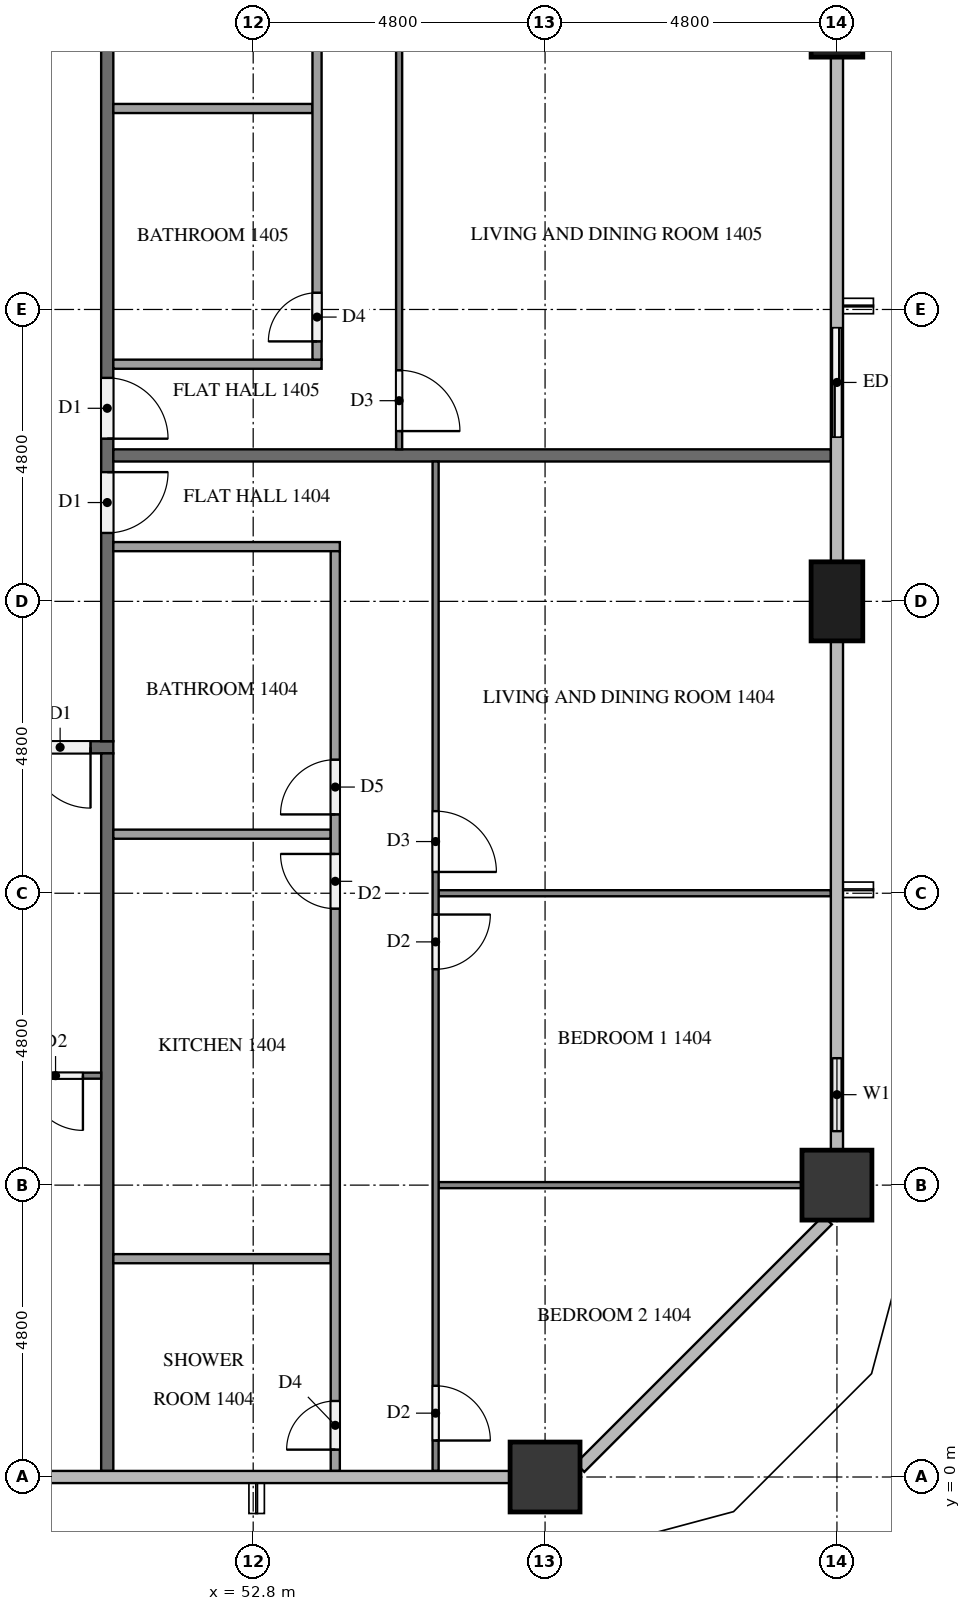
"""IFC4 building model, lengths in metres.
Left out: names, types, materials, properties, quantities, classifications, styles, units other than length and angle.
Written with IfcOpenShell. Run it as: python <this file> out.ifc"""

import sys

from ifc_helpers import new_model, si_unit, direction, frame, frame_2d, origin, origin_2d, place, context, subcontext, project, spatial, rectangle, extrude, element, fill, save


model = new_model("IFC4")
c1 = context("Model", 3, precision=1e-05, world=origin(), true_north=direction((0.0, 1.0)))
c2 = subcontext(c1, "Body", "Model", "MODEL_VIEW")
j1 = project(units=[si_unit("LENGTHUNIT", "METRE"), si_unit("PLANEANGLEUNIT", "RADIAN")], contexts=[c1])
p1 = place(None, origin())
s1 = spatial("IfcSite", under=j1, at=p1, CompositionType="ELEMENT")
p2 = place(p1, origin())
s2 = spatial("IfcBuilding", under=s1, at=p2, CompositionType="ELEMENT")
p3 = place(p2, frame((0.0, 0.0, 59.3)))
s3 = spatial("IfcBuildingStorey", under=s2, at=p3, CompositionType="ELEMENT", Elevation=59.3)
for number, where, z_axis, x_axis in (
    (1, (57.6, 0.0, 0.0), (0.0, 0.0, 1.0), (1.0, 0.0, 0.0)),
    (2, (62.4, 4.8, 0.0), (0.0, 0.0, 1.0), (1.0, 0.0, 0.0)),
):
    element("IfcColumn", number, at=place(p3, frame(where, z_axis=z_axis, x_axis=x_axis)), inside=s3, PredefinedType="COLUMN", context=c2, shape_type="SweptSolid", body=[
        extrude(rectangle(XDim=1.15, YDim=1.15, at=origin_2d()), origin(), (0.0, 0.0, 1.0), 3.2),
    ])
for number, where, z_axis, x_axis in (
    (3, (62.4, 14.4, 0.0), (0.0, 0.0, 1.0), (0.0, 1.0, 0.0)),
    (4, (62.4, 24.0, 0.0), (0.0, 0.0, 1.0), (0.0, 1.0, 0.0)),
):
    element("IfcColumn", number, at=place(p3, frame(where, z_axis=z_axis, x_axis=x_axis)), inside=s3, PredefinedType="COLUMN", context=c2, shape_type="SweptSolid", body=[
        extrude(rectangle(XDim=1.3, YDim=0.85, at=origin_2d()), origin(), (0.0, 0.0, 1.0), 3.2),
    ])
p4 = place(p3, frame((62.4, 5.375, 0.0), z_axis=(0.0, 0.0, 1.0), x_axis=(0.0, 1.0, 0.0)))
e5 = element("IfcWall", 5, at=p4, inside=s3, PredefinedType="SOLIDWALL", context=c2, shape_type="SweptSolid", body=[
    extrude(rectangle(XDim=1.825, YDim=0.15, at=frame_2d((0.913, 0.0))), origin(), (0.0, 0.0, 1.0), 3.2),
])
p5 = place(p4, frame((0.312, 0.0, 0.9)))
e6 = element("IfcOpeningElement", 6, at=p5, cuts=e5, PredefinedType="OPENING", context=c2, shape_type="SweptSolid", body=[
    extrude(rectangle(XDim=1.2, YDim=1.4, at=frame_2d((0.6, 0.7))), frame((0.0, 0.085, 0.0), z_axis=(0.0, -1.0, 0.0), x_axis=(1.0, 0.0, 0.0)), (0.0, 0.0, 1.0), 0.17),
])
p6 = place(p3, frame((62.4, 16.8, 0.0), z_axis=(0.0, 0.0, 1.0), x_axis=(0.0, 1.0, 0.0)))
e7 = element("IfcWall", 7, at=p6, inside=s3, PredefinedType="SOLIDWALL", context=c2, shape_type="SweptSolid", body=[
    extrude(rectangle(XDim=2.4, YDim=0.15, at=frame_2d((1.2, 0.0))), origin(), (0.0, 0.0, 1.0), 3.2),
])
p7 = place(p6, frame((0.3, 0.0, 0.0)))
e8 = element("IfcOpeningElement", 8, at=p7, cuts=e7, PredefinedType="OPENING", context=c2, shape_type="SweptSolid", body=[
    extrude(rectangle(XDim=1.8, YDim=2.4, at=frame_2d((0.9, 1.2))), frame((0.0, 0.085, 0.0), z_axis=(0.0, -1.0, 0.0), x_axis=(1.0, 0.0, 0.0)), (0.0, 0.0, 1.0), 0.17),
])
p8 = place(p3, frame((50.5, 12.0, 0.0), z_axis=(0.0, 0.0, 1.0), x_axis=(-1.0, 0.0, 0.0)))
e9 = element("IfcWall", 9, at=p8, inside=s3, PredefinedType="PARTITIONING", context=c2, shape_type="SweptSolid", body=[
    extrude(rectangle(XDim=38.6, YDim=0.2, at=frame_2d((19.3, 0.0))), origin(), (0.0, 0.0, 1.0), 3.2),
])
p9 = place(p8, frame((37.225, 0.0, 0.0)))
e10 = element("IfcOpeningElement", 10, at=p9, cuts=e9, PredefinedType="OPENING", context=c2, shape_type="SweptSolid", body=[
    extrude(rectangle(XDim=1.0, YDim=2.1, at=frame_2d((0.5, 1.05))), frame((0.0, 0.11, 0.0), z_axis=(0.0, -1.0, 0.0), x_axis=(1.0, 0.0, 0.0)), (0.0, 0.0, 1.0), 0.22),
])
p10 = place(p8, frame((22.825, 0.0, 0.0)))
e11 = element("IfcOpeningElement", 11, at=p10, cuts=e9, PredefinedType="OPENING", context=c2, shape_type="SweptSolid", body=[
    extrude(rectangle(XDim=1.0, YDim=2.1, at=frame_2d((0.5, 1.05))), frame((0.0, 0.11, 0.0), z_axis=(0.0, -1.0, 0.0), x_axis=(1.0, 0.0, 0.0)), (0.0, 0.0, 1.0), 0.22),
])
p11 = place(p8, frame((0.375, 0.0, 0.0)))
e12 = element("IfcOpeningElement", 12, at=p11, cuts=e9, PredefinedType="OPENING", context=c2, shape_type="SweptSolid", body=[
    extrude(rectangle(XDim=1.0, YDim=2.1, at=frame_2d((0.5, 1.05))), frame((0.0, 0.11, 0.0), z_axis=(0.0, -1.0, 0.0), x_axis=(1.0, 0.0, 0.0)), (0.0, 0.0, 1.0), 0.22),
])
p12 = place(p3, frame((50.4, 40.7, 0.0), z_axis=(0.0, 0.0, 1.0), x_axis=(0.0, -1.0, 0.0)))
e13 = element("IfcWall", 13, at=p12, inside=s3, PredefinedType="PARTITIONING", context=c2, shape_type="SweptSolid", body=[
    extrude(rectangle(XDim=28.6, YDim=0.2, at=frame_2d((14.3, 0.0))), origin(), (0.0, 0.0, 1.0), 3.2),
])
p13 = place(p12, frame((24.175, 0.0, 0.0)))
e14 = element("IfcOpeningElement", 14, at=p13, cuts=e13, PredefinedType="OPENING", context=c2, shape_type="SweptSolid", body=[
    extrude(rectangle(XDim=1.0, YDim=2.1, at=frame_2d((0.5, 1.05))), frame((0.0, 0.11, 0.0), z_axis=(0.0, -1.0, 0.0), x_axis=(1.0, 0.0, 0.0)), (0.0, 0.0, 1.0), 0.22),
])
p14 = place(p12, frame((22.625, 0.0, 0.0)))
e15 = element("IfcOpeningElement", 15, at=p14, cuts=e13, PredefinedType="OPENING", context=c2, shape_type="SweptSolid", body=[
    extrude(rectangle(XDim=1.0, YDim=2.1, at=frame_2d((0.5, 1.05))), frame((0.0, 0.11, 0.0), z_axis=(0.0, -1.0, 0.0), x_axis=(1.0, 0.0, 0.0)), (0.0, 0.0, 1.0), 0.22),
])
p15 = place(p12, frame((10.625, 0.0, 0.0)))
e16 = element("IfcOpeningElement", 16, at=p15, cuts=e13, PredefinedType="OPENING", context=c2, shape_type="SweptSolid", body=[
    extrude(rectangle(XDim=1.0, YDim=2.1, at=frame_2d((0.5, 1.05))), frame((0.0, 0.11, 0.0), z_axis=(0.0, -1.0, 0.0), x_axis=(1.0, 0.0, 0.0)), (0.0, 0.0, 1.0), 0.22),
])
p16 = place(p3, frame((50.4, 11.9, 0.0), z_axis=(0.0, 0.0, 1.0), x_axis=(0.0, -1.0, 0.0)))
e17 = element("IfcWall", 17, at=p16, inside=s3, PredefinedType="PARTITIONING", context=c2, shape_type="SweptSolid", body=[
    extrude(rectangle(XDim=11.8, YDim=0.2, at=frame_2d((5.9, 0.0))), origin(), (0.0, 0.0, 1.0), 3.2),
])
p17 = place(p3, frame((50.5, 16.8, 0.0), z_axis=(0.0, 0.0, 1.0), x_axis=(1.0, 0.0, 0.0)))
e18 = element("IfcWall", 18, at=p17, inside=s3, PredefinedType="PARTITIONING", context=c2, shape_type="SweptSolid", body=[
    extrude(rectangle(XDim=11.8, YDim=0.2, at=frame_2d((5.9, 0.0))), origin(), (0.0, 0.0, 1.0), 3.2),
])
p18 = place(p3, frame((50.3, 6.6, 0.0), z_axis=(0.0, 0.0, 1.0), x_axis=(-1.0, 0.0, 0.0)))
e19 = element("IfcWall", 19, at=p18, inside=s3, PredefinedType="PARTITIONING", context=c2, shape_type="SweptSolid", body=[
    extrude(rectangle(XDim=9.4, YDim=0.1, at=frame_2d((4.7, 0.0))), origin(), (0.0, 0.0, 1.0), 3.2),
])
p19 = place(p18, frame((0.3, 0.0, 0.0)))
e20 = element("IfcOpeningElement", 20, at=p19, cuts=e19, PredefinedType="OPENING", context=c2, shape_type="SweptSolid", body=[
    extrude(rectangle(XDim=0.9, YDim=2.1, at=frame_2d((0.45, 1.05))), frame((0.0, 0.06, 0.0), z_axis=(0.0, -1.0, 0.0), x_axis=(1.0, 0.0, 0.0)), (0.0, 0.0, 1.0), 0.12),
])
p20 = place(p18, frame((8.1, 0.0, 0.0)))
e21 = element("IfcOpeningElement", 21, at=p20, cuts=e19, PredefinedType="OPENING", context=c2, shape_type="SweptSolid", body=[
    extrude(rectangle(XDim=1.0, YDim=2.1, at=frame_2d((0.5, 1.05))), frame((0.0, 0.06, 0.0), z_axis=(0.0, -1.0, 0.0), x_axis=(1.0, 0.0, 0.0)), (0.0, 0.0, 1.0), 0.12),
])
p21 = place(p3, frame((55.85, 9.6, 0.0), z_axis=(0.0, 0.0, 1.0), x_axis=(1.0, 0.0, 0.0)))
e22 = element("IfcWall", 22, at=p21, inside=s3, PredefinedType="PARTITIONING", context=c2, shape_type="SweptSolid", body=[
    extrude(rectangle(XDim=6.45, YDim=0.1, at=frame_2d((3.225, 0.0))), origin(), (0.0, 0.0, 1.0), 3.2),
])
p22 = place(p3, frame((55.85, 4.8, 0.0), z_axis=(0.0, 0.0, 1.0), x_axis=(1.0, 0.0, 0.0)))
e23 = element("IfcWall", 23, at=p22, inside=s3, PredefinedType="PARTITIONING", context=c2, shape_type="SweptSolid", body=[
    extrude(rectangle(XDim=5.975, YDim=0.1, at=frame_2d((2.987, 0.0))), origin(), (0.0, 0.0, 1.0), 3.2),
])
p23 = place(p3, frame((55.8, 16.7, 0.0), z_axis=(0.0, 0.0, 1.0), x_axis=(0.0, -1.0, 0.0)))
e24 = element("IfcWall", 24, at=p23, inside=s3, PredefinedType="PARTITIONING", context=c2, shape_type="SweptSolid", body=[
    extrude(rectangle(XDim=16.6, YDim=0.1, at=frame_2d((8.3, 0.0))), origin(), (0.0, 0.0, 1.0), 3.2),
])
p24 = place(p23, frame((5.75, 0.0, 0.0)))
e25 = element("IfcOpeningElement", 25, at=p24, cuts=e24, PredefinedType="OPENING", context=c2, shape_type="SweptSolid", body=[
    extrude(rectangle(XDim=1.0, YDim=2.1, at=frame_2d((0.5, 1.05))), frame((0.0, 0.06, 0.0), z_axis=(0.0, -1.0, 0.0), x_axis=(1.0, 0.0, 0.0)), (0.0, 0.0, 1.0), 0.12),
])
p25 = place(p23, frame((7.45, 0.0, 0.0)))
e26 = element("IfcOpeningElement", 26, at=p25, cuts=e24, PredefinedType="OPENING", context=c2, shape_type="SweptSolid", body=[
    extrude(rectangle(XDim=0.9, YDim=2.1, at=frame_2d((0.45, 1.05))), frame((0.0, 0.06, 0.0), z_axis=(0.0, -1.0, 0.0), x_axis=(1.0, 0.0, 0.0)), (0.0, 0.0, 1.0), 0.12),
])
p26 = place(p23, frame((15.2, 0.0, 0.0)))
e27 = element("IfcOpeningElement", 27, at=p26, cuts=e24, PredefinedType="OPENING", context=c2, shape_type="SweptSolid", body=[
    extrude(rectangle(XDim=0.9, YDim=2.1, at=frame_2d((0.45, 1.05))), frame((0.0, 0.06, 0.0), z_axis=(0.0, -1.0, 0.0), x_axis=(1.0, 0.0, 0.0)), (0.0, 0.0, 1.0), 0.12),
])
for number, where, z_axis, x_axis in (
    (28, (50.5, 10.571, 0.0), (0.0, 0.0, 1.0), (1.0, 0.0, 0.0)),
    (29, (50.5, 3.59, 0.0), (0.0, 0.0, 1.0), (1.0, 0.0, 0.0)),
):
    element("IfcWall", number, at=place(p3, frame(where, z_axis=z_axis, x_axis=x_axis)), inside=s3, PredefinedType="PARTITIONING", context=c2, shape_type="SweptSolid", body=[
        extrude(rectangle(XDim=3.575, YDim=0.15, at=frame_2d((1.788, 0.0))), origin(), (0.0, 0.0, 1.0), 3.2),
    ])
p27 = place(p3, frame((50.5, 15.3, 0.0), z_axis=(0.0, 0.0, 1.0), x_axis=(1.0, 0.0, 0.0)))
e30 = element("IfcWall", 30, at=p27, inside=s3, PredefinedType="PARTITIONING", context=c2, shape_type="SweptSolid", body=[
    extrude(rectangle(XDim=3.725, YDim=0.15, at=frame_2d((1.863, 0.0))), origin(), (0.0, 0.0, 1.0), 3.2),
])
p28 = place(p3, frame((54.15, 0.1, 0.0), z_axis=(0.0, 0.0, 1.0), x_axis=(0.0, 1.0, 0.0)))
e31 = element("IfcWall", 31, at=p28, inside=s3, PredefinedType="PARTITIONING", context=c2, shape_type="SweptSolid", body=[
    extrude(rectangle(XDim=15.125, YDim=0.15, at=frame_2d((7.562, 0.0))), origin(), (0.0, 0.0, 1.0), 3.2),
])
p29 = place(p28, frame((10.796, 0.0, 0.0)))
e32 = element("IfcOpeningElement", 32, at=p29, cuts=e31, PredefinedType="OPENING", context=c2, shape_type="SweptSolid", body=[
    extrude(rectangle(XDim=0.9, YDim=2.1, at=frame_2d((0.45, 1.05))), frame((0.0, 0.085, 0.0), z_axis=(0.0, -1.0, 0.0), x_axis=(1.0, 0.0, 0.0)), (0.0, 0.0, 1.0), 0.17),
])
p30 = place(p28, frame((9.246, 0.0, 0.0)))
e33 = element("IfcOpeningElement", 33, at=p30, cuts=e31, PredefinedType="OPENING", context=c2, shape_type="SweptSolid", body=[
    extrude(rectangle(XDim=0.9, YDim=2.1, at=frame_2d((0.45, 1.05))), frame((0.0, 0.085, 0.0), z_axis=(0.0, -1.0, 0.0), x_axis=(1.0, 0.0, 0.0)), (0.0, 0.0, 1.0), 0.17),
])
p31 = place(p28, frame((0.35, 0.0, 0.0)))
e34 = element("IfcOpeningElement", 34, at=p31, cuts=e31, PredefinedType="OPENING", context=c2, shape_type="SweptSolid", body=[
    extrude(rectangle(XDim=0.8, YDim=2.1, at=frame_2d((0.4, 1.05))), frame((0.0, 0.085, 0.0), z_axis=(0.0, -1.0, 0.0), x_axis=(1.0, 0.0, 0.0)), (0.0, 0.0, 1.0), 0.17),
])
p32 = place(p3, frame((55.2, 28.7, 0.0), z_axis=(0.0, 0.0, 1.0), x_axis=(0.0, -1.0, 0.0)))
e35 = element("IfcWall", 35, at=p32, inside=s3, PredefinedType="PARTITIONING", context=c2, shape_type="SweptSolid", body=[
    extrude(rectangle(XDim=11.8, YDim=0.1, at=frame_2d((5.9, 0.0))), origin(), (0.0, 0.0, 1.0), 3.2),
])
p33 = place(p32, frame((10.5, 0.0, 0.0)))
e36 = element("IfcOpeningElement", 36, at=p33, cuts=e35, PredefinedType="OPENING", context=c2, shape_type="SweptSolid", body=[
    extrude(rectangle(XDim=1.0, YDim=2.1, at=frame_2d((0.5, 1.05))), frame((0.0, 0.06, 0.0), z_axis=(0.0, -1.0, 0.0), x_axis=(1.0, 0.0, 0.0)), (0.0, 0.0, 1.0), 0.12),
])
p34 = place(p32, frame((0.3, 0.0, 0.0)))
e37 = element("IfcOpeningElement", 37, at=p34, cuts=e35, PredefinedType="OPENING", context=c2, shape_type="SweptSolid", body=[
    extrude(rectangle(XDim=0.9, YDim=2.1, at=frame_2d((0.45, 1.05))), frame((0.0, 0.06, 0.0), z_axis=(0.0, -1.0, 0.0), x_axis=(1.0, 0.0, 0.0)), (0.0, 0.0, 1.0), 0.12),
])
p35 = place(p3, frame((50.5, 22.505, 0.0), z_axis=(0.0, 0.0, 1.0), x_axis=(1.0, 0.0, 0.0)))
e38 = element("IfcWall", 38, at=p35, inside=s3, PredefinedType="PARTITIONING", context=c2, shape_type="SweptSolid", body=[
    extrude(rectangle(XDim=3.275, YDim=0.15, at=frame_2d((1.637, 0.0))), origin(), (0.0, 0.0, 1.0), 3.2),
])
p36 = place(p3, frame((50.5, 18.3, 0.0), z_axis=(0.0, 0.0, 1.0), x_axis=(1.0, 0.0, 0.0)))
e39 = element("IfcWall", 39, at=p36, inside=s3, PredefinedType="PARTITIONING", context=c2, shape_type="SweptSolid", body=[
    extrude(rectangle(XDim=3.425, YDim=0.15, at=frame_2d((1.712, 0.0))), origin(), (0.0, 0.0, 1.0), 3.2),
])
p37 = place(p3, frame((53.85, 18.375, 0.0), z_axis=(0.0, 0.0, 1.0), x_axis=(0.0, 1.0, 0.0)))
e40 = element("IfcWall", 40, at=p37, inside=s3, PredefinedType="PARTITIONING", context=c2, shape_type="SweptSolid", body=[
    extrude(rectangle(XDim=10.325, YDim=0.15, at=frame_2d((5.163, 0.0))), origin(), (0.0, 0.0, 1.0), 3.2),
])
p38 = place(p37, frame((0.3, 0.0, 0.0)))
e41 = element("IfcOpeningElement", 41, at=p38, cuts=e40, PredefinedType="OPENING", context=c2, shape_type="SweptSolid", body=[
    extrude(rectangle(XDim=0.8, YDim=2.1, at=frame_2d((0.4, 1.05))), frame((0.0, 0.085, 0.0), z_axis=(0.0, -1.0, 0.0), x_axis=(1.0, 0.0, 0.0)), (0.0, 0.0, 1.0), 0.17),
])
p39 = place(p37, frame((9.075, 0.0, 0.0)))
e42 = element("IfcOpeningElement", 42, at=p39, cuts=e40, PredefinedType="OPENING", context=c2, shape_type="SweptSolid", body=[
    extrude(rectangle(XDim=0.9, YDim=2.1, at=frame_2d((0.45, 1.05))), frame((0.0, 0.085, 0.0), z_axis=(0.0, -1.0, 0.0), x_axis=(1.0, 0.0, 0.0)), (0.0, 0.0, 1.0), 0.17),
])
p40 = place(p5, origin())
e43 = element("IfcWindow", 43, at=p40, inside=s3, PartitioningType="SINGLE_PANEL", PredefinedType="WINDOW", context=c2, shape_type="SweptSolid", body=[
    extrude(rectangle(XDim=1.2, YDim=1.4, at=frame_2d((0.6, 0.7))), frame((0.0, 0.03, 0.0), z_axis=(0.0, -1.0, 0.0), x_axis=(1.0, 0.0, 0.0)), (0.0, 0.0, 1.0), 0.06),
])
fill(e6, e43)
p41 = place(p7, origin())
e44 = element("IfcDoor", 44, at=p41, inside=s3, OperationType="SLIDING_TO_LEFT", PredefinedType="DOOR", context=c2, shape_type="SweptSolid", body=[
    extrude(rectangle(XDim=1.8, YDim=2.4, at=frame_2d((0.9, 1.2))), frame((0.0, 0.025, 0.0), z_axis=(0.0, -1.0, 0.0), x_axis=(1.0, 0.0, 0.0)), (0.0, 0.0, 1.0), 0.05),
])
fill(e8, e44)
p42 = place(p11, origin())
e45 = element("IfcDoor", 45, at=p42, inside=s3, OperationType="SINGLE_SWING_LEFT", PredefinedType="DOOR", context=c2, shape_type="SweptSolid", body=[
    extrude(rectangle(XDim=1.0, YDim=2.1, at=frame_2d((0.5, 1.05))), frame((0.0, 0.025, 0.0), z_axis=(0.0, -1.0, 0.0), x_axis=(1.0, 0.0, 0.0)), (0.0, 0.0, 1.0), 0.05),
])
fill(e12, e45)
p43 = place(p13, origin())
e46 = element("IfcDoor", 46, at=p43, inside=s3, OperationType="SINGLE_SWING_LEFT", PredefinedType="DOOR", context=c2, shape_type="SweptSolid", body=[
    extrude(rectangle(XDim=1.0, YDim=2.1, at=frame_2d((0.5, 1.05))), frame((0.0, 0.025, 0.0), z_axis=(0.0, -1.0, 0.0), x_axis=(1.0, 0.0, 0.0)), (0.0, 0.0, 1.0), 0.05),
])
fill(e14, e46)
p44 = place(p14, origin())
e47 = element("IfcDoor", 47, at=p44, inside=s3, OperationType="SINGLE_SWING_RIGHT", PredefinedType="DOOR", context=c2, shape_type="SweptSolid", body=[
    extrude(rectangle(XDim=1.0, YDim=2.1, at=frame_2d((0.5, 1.05))), frame((0.0, 0.025, 0.0), z_axis=(0.0, -1.0, 0.0), x_axis=(1.0, 0.0, 0.0)), (0.0, 0.0, 1.0), 0.05),
])
fill(e15, e47)
p45 = place(p19, origin())
e48 = element("IfcDoor", 48, at=p45, inside=s3, OperationType="SINGLE_SWING_LEFT", PredefinedType="DOOR", context=c2, shape_type="SweptSolid", body=[
    extrude(rectangle(XDim=0.9, YDim=2.1, at=frame_2d((0.45, 1.05))), frame((0.0, 0.025, 0.0), z_axis=(0.0, -1.0, 0.0), x_axis=(1.0, 0.0, 0.0)), (0.0, 0.0, 1.0), 0.05),
])
fill(e20, e48)
p46 = place(p24, origin())
e49 = element("IfcDoor", 49, at=p46, inside=s3, OperationType="SINGLE_SWING_RIGHT", PredefinedType="DOOR", context=c2, shape_type="SweptSolid", body=[
    extrude(rectangle(XDim=1.0, YDim=2.1, at=frame_2d((0.5, 1.05))), frame((0.0, 0.025, 0.0), z_axis=(0.0, -1.0, 0.0), x_axis=(1.0, 0.0, 0.0)), (0.0, 0.0, 1.0), 0.05),
])
fill(e25, e49)
p47 = place(p25, origin())
e50 = element("IfcDoor", 50, at=p47, inside=s3, OperationType="SINGLE_SWING_LEFT", PredefinedType="DOOR", context=c2, shape_type="SweptSolid", body=[
    extrude(rectangle(XDim=0.9, YDim=2.1, at=frame_2d((0.45, 1.05))), frame((0.0, 0.025, 0.0), z_axis=(0.0, -1.0, 0.0), x_axis=(1.0, 0.0, 0.0)), (0.0, 0.0, 1.0), 0.05),
])
fill(e26, e50)
p48 = place(p26, origin())
e51 = element("IfcDoor", 51, at=p48, inside=s3, OperationType="SINGLE_SWING_RIGHT", PredefinedType="DOOR", context=c2, shape_type="SweptSolid", body=[
    extrude(rectangle(XDim=0.9, YDim=2.1, at=frame_2d((0.45, 1.05))), frame((0.0, 0.025, 0.0), z_axis=(0.0, -1.0, 0.0), x_axis=(1.0, 0.0, 0.0)), (0.0, 0.0, 1.0), 0.05),
])
fill(e27, e51)
p49 = place(p29, origin())
e52 = element("IfcDoor", 52, at=p49, inside=s3, OperationType="SINGLE_SWING_LEFT", PredefinedType="DOOR", context=c2, shape_type="SweptSolid", body=[
    extrude(rectangle(XDim=0.9, YDim=2.1, at=frame_2d((0.45, 1.05))), frame((0.0, 0.025, 0.0), z_axis=(0.0, -1.0, 0.0), x_axis=(1.0, 0.0, 0.0)), (0.0, 0.0, 1.0), 0.05),
])
fill(e32, e52)
p50 = place(p30, origin())
e53 = element("IfcDoor", 53, at=p50, inside=s3, OperationType="SINGLE_SWING_RIGHT", PredefinedType="DOOR", context=c2, shape_type="SweptSolid", body=[
    extrude(rectangle(XDim=0.9, YDim=2.1, at=frame_2d((0.45, 1.05))), frame((0.0, 0.025, 0.0), z_axis=(0.0, -1.0, 0.0), x_axis=(1.0, 0.0, 0.0)), (0.0, 0.0, 1.0), 0.05),
])
fill(e33, e53)
p51 = place(p31, origin())
e54 = element("IfcDoor", 54, at=p51, inside=s3, OperationType="SINGLE_SWING_LEFT", PredefinedType="DOOR", context=c2, shape_type="SweptSolid", body=[
    extrude(rectangle(XDim=0.8, YDim=2.1, at=frame_2d((0.4, 1.05))), frame((0.0, 0.025, 0.0), z_axis=(0.0, -1.0, 0.0), x_axis=(1.0, 0.0, 0.0)), (0.0, 0.0, 1.0), 0.05),
])
fill(e34, e54)
p52 = place(p33, origin())
e55 = element("IfcDoor", 55, at=p52, inside=s3, OperationType="SINGLE_SWING_RIGHT", PredefinedType="DOOR", context=c2, shape_type="SweptSolid", body=[
    extrude(rectangle(XDim=1.0, YDim=2.1, at=frame_2d((0.5, 1.05))), frame((0.0, 0.025, 0.0), z_axis=(0.0, -1.0, 0.0), x_axis=(1.0, 0.0, 0.0)), (0.0, 0.0, 1.0), 0.05),
])
fill(e36, e55)
p53 = place(p38, origin())
e56 = element("IfcDoor", 56, at=p53, inside=s3, OperationType="SINGLE_SWING_LEFT", PredefinedType="DOOR", context=c2, shape_type="SweptSolid", body=[
    extrude(rectangle(XDim=0.8, YDim=2.1, at=frame_2d((0.4, 1.05))), frame((0.0, 0.025, 0.0), z_axis=(0.0, -1.0, 0.0), x_axis=(1.0, 0.0, 0.0)), (0.0, 0.0, 1.0), 0.05),
])
fill(e41, e56)
save(model, sys.argv[1])
